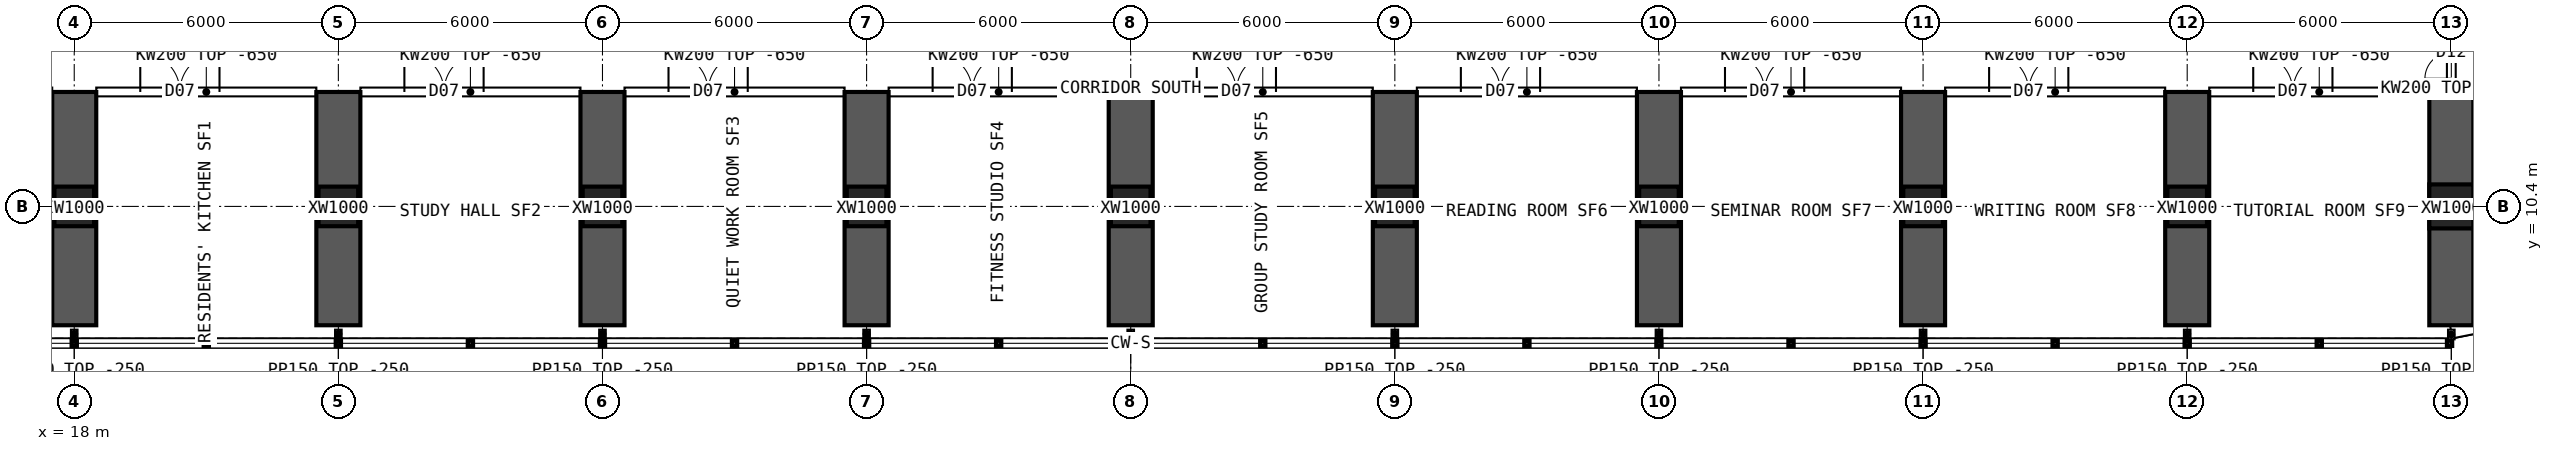
"""IFC4 building model, lengths in metres.
Left out: names, types, materials, properties, quantities, classifications, styles, units other than length and angle.
Written with IfcOpenShell. Run it as: python <this file> out.ifc"""

import sys

from ifc_helpers import new_model, si_unit, direction, frame, frame_2d, origin, origin_2d, place, context, subcontext, project, spatial, polyline, rectangle, hollow_rectangle, outline, extrude, element, fill, save


model = new_model("IFC4")
c1 = context("Model", 3, precision=1e-05, world=origin(), true_north=direction((0.0, 1.0)))
c2 = subcontext(c1, "Body", "Model", "MODEL_VIEW")
j1 = project(units=[si_unit("LENGTHUNIT", "METRE"), si_unit("PLANEANGLEUNIT", "RADIAN")], contexts=[c1])
p1 = place(None, origin())
s1 = spatial("IfcSite", under=j1, at=p1, CompositionType="ELEMENT")
p2 = place(p1, origin())
s2 = spatial("IfcBuilding", under=s1, at=p2, CompositionType="ELEMENT")
p3 = place(p2, frame((0.0, 0.0, 16.0)))
s3 = spatial("IfcBuildingStorey", under=s2, at=p3, CompositionType="ELEMENT", Elevation=16.0)
for number, where, z_axis, x_axis in (
    (1, (18.0, 10.4, 0.0), (0.0, 0.0, 1.0), (1.0, 0.0, 0.0)),
    (2, (24.0, 10.4, 0.0), (0.0, 0.0, 1.0), (1.0, 0.0, 0.0)),
    (3, (30.0, 10.4, 0.0), (0.0, 0.0, 1.0), (1.0, 0.0, 0.0)),
    (4, (36.0, 10.4, 0.0), (0.0, 0.0, 1.0), (1.0, 0.0, 0.0)),
    (5, (42.0, 10.4, 0.0), (0.0, 0.0, 1.0), (1.0, 0.0, 0.0)),
    (6, (48.0, 10.4, 0.0), (0.0, 0.0, 1.0), (1.0, 0.0, 0.0)),
    (7, (54.0, 10.4, 0.0), (0.0, 0.0, 1.0), (1.0, 0.0, 0.0)),
    (8, (60.0, 10.4, 0.0), (0.0, 0.0, 1.0), (1.0, 0.0, 0.0)),
    (9, (66.0, 10.4, 0.0), (0.0, 0.0, 1.0), (1.0, 0.0, 0.0)),
):
    element("IfcColumn", number, at=place(p3, frame(where, z_axis=z_axis, x_axis=x_axis)), inside=s3, PredefinedType="COLUMN", context=c2, shape_type="SweptSolid", body=[
        extrude(hollow_rectangle(XDim=0.9, YDim=0.9, WallThickness=0.09, at=origin_2d()), origin(), (0.0, 0.0, 1.0), 4.2),
    ])
p4 = place(p3, frame((72.0, 10.4, 0.0), z_axis=(0.0, 0.0, 1.0), x_axis=(1.0, 0.0, 0.0)))
e10 = element("IfcColumn", 10, at=p4, inside=s3, PredefinedType="COLUMN", context=c2, shape_type="SweptSolid", body=[
    extrude(hollow_rectangle(XDim=1.0, YDim=1.0, WallThickness=0.1, at=origin_2d()), origin(), (0.0, 0.0, 1.0), 4.2),
])
for number, where, z_axis, x_axis in (
    (11, (18.0, 7.7, 0.0), (0.0, 0.0, 1.0), (0.0, 1.0, 0.0)),
    (12, (24.0, 7.7, 0.0), (0.0, 0.0, 1.0), (0.0, 1.0, 0.0)),
    (13, (30.0, 7.7, 0.0), (0.0, 0.0, 1.0), (0.0, 1.0, 0.0)),
    (14, (36.0, 7.7, 0.0), (0.0, 0.0, 1.0), (0.0, 1.0, 0.0)),
    (15, (42.0, 7.7, 0.0), (0.0, 0.0, 1.0), (0.0, 1.0, 0.0)),
    (16, (48.0, 7.7, 0.0), (0.0, 0.0, 1.0), (0.0, 1.0, 0.0)),
    (17, (54.0, 7.7, 0.0), (0.0, 0.0, 1.0), (0.0, 1.0, 0.0)),
    (18, (60.0, 7.7, 0.0), (0.0, 0.0, 1.0), (0.0, 1.0, 0.0)),
    (19, (66.0, 7.7, 0.0), (0.0, 0.0, 1.0), (0.0, 1.0, 0.0)),
    (20, (72.0, 7.7, 0.0), (0.0, 0.0, 1.0), (0.0, 1.0, 0.0)),
):
    element("IfcWall", number, at=place(p3, frame(where, z_axis=z_axis, x_axis=x_axis)), inside=s3, PredefinedType="SHEAR", context=c2, shape_type="SweptSolid", body=[
        extrude(rectangle(XDim=5.3, YDim=1.0, at=frame_2d((2.65, 0.0))), origin(), (0.0, 0.0, 1.0), 4.2),
    ])
p5 = place(p3, frame((72.0, 7.55, 0.0), z_axis=(0.0, 0.0, 1.0), x_axis=(0.980787251524, 0.195080412259, 0.0)))
e21 = element("IfcWall", 21, at=p5, inside=s3, PredefinedType="SOLIDWALL", context=c2, shape_type="SweptSolid", body=[
    extrude(outline(polyline([(-0.03, -0.15), (3.249, -0.15), (3.189, 0.15), (0.03, 0.15), (-0.03, -0.15)])), origin(), (0.0, 0.0, 1.0), 3.95),
])
p6 = place(p5, frame((0.909, 0.0, 0.9)))
e22 = element("IfcOpeningElement", 22, at=p6, cuts=e21, PredefinedType="OPENING", context=c2, shape_type="SweptSolid", body=[
    extrude(rectangle(XDim=1.4, YDim=1.8, at=frame_2d((0.7, 0.9))), frame((0.0, 0.16, 0.0), z_axis=(0.0, -1.0, 0.0), x_axis=(1.0, 0.0, 0.0)), (0.0, 0.0, 1.0), 0.32),
])
p7 = place(p3, frame((18.5, 13.0, 0.0), z_axis=(0.0, 0.0, 1.0), x_axis=(1.0, 0.0, 0.0)))
e23 = element("IfcWall", 23, at=p7, inside=s3, PredefinedType="SOLIDWALL", context=c2, shape_type="SweptSolid", body=[
    extrude(outline(polyline([(0.0, 0.0), (5.0, 0.0), (5.0, 3.55), (0.0, 3.55), (0.0, 0.0)])), frame((0.0, 0.1, 0.0), z_axis=(0.0, -1.0, 0.0), x_axis=(1.0, 0.0, 0.0)), (0.0, 0.0, 1.0), 0.2),
])
p8 = place(p7, frame((1.0, 0.0, 0.0)))
e24 = element("IfcOpeningElement", 24, at=p8, cuts=e23, PredefinedType="OPENING", context=c2, shape_type="SweptSolid", body=[
    extrude(rectangle(XDim=1.8, YDim=2.1, at=frame_2d((0.9, 1.05))), frame((0.0, 0.11, 0.0), z_axis=(0.0, -1.0, 0.0), x_axis=(1.0, 0.0, 0.0)), (0.0, 0.0, 1.0), 0.22),
])
p9 = place(p3, frame((24.5, 13.0, 0.0), z_axis=(0.0, 0.0, 1.0), x_axis=(1.0, 0.0, 0.0)))
e25 = element("IfcWall", 25, at=p9, inside=s3, PredefinedType="SOLIDWALL", context=c2, shape_type="SweptSolid", body=[
    extrude(outline(polyline([(0.0, 0.0), (5.0, 0.0), (5.0, 3.55), (0.0, 3.55), (0.0, 0.0)])), frame((0.0, 0.1, 0.0), z_axis=(0.0, -1.0, 0.0), x_axis=(1.0, 0.0, 0.0)), (0.0, 0.0, 1.0), 0.2),
])
p10 = place(p9, frame((1.0, 0.0, 0.0)))
e26 = element("IfcOpeningElement", 26, at=p10, cuts=e25, PredefinedType="OPENING", context=c2, shape_type="SweptSolid", body=[
    extrude(rectangle(XDim=1.8, YDim=2.1, at=frame_2d((0.9, 1.05))), frame((0.0, 0.11, 0.0), z_axis=(0.0, -1.0, 0.0), x_axis=(1.0, 0.0, 0.0)), (0.0, 0.0, 1.0), 0.22),
])
p11 = place(p3, frame((30.5, 13.0, 0.0), z_axis=(0.0, 0.0, 1.0), x_axis=(1.0, 0.0, 0.0)))
e27 = element("IfcWall", 27, at=p11, inside=s3, PredefinedType="SOLIDWALL", context=c2, shape_type="SweptSolid", body=[
    extrude(outline(polyline([(0.0, 0.0), (5.0, 0.0), (5.0, 3.55), (0.0, 3.55), (0.0, 0.0)])), frame((0.0, 0.1, 0.0), z_axis=(0.0, -1.0, 0.0), x_axis=(1.0, 0.0, 0.0)), (0.0, 0.0, 1.0), 0.2),
])
p12 = place(p11, frame((1.0, 0.0, 0.0)))
e28 = element("IfcOpeningElement", 28, at=p12, cuts=e27, PredefinedType="OPENING", context=c2, shape_type="SweptSolid", body=[
    extrude(rectangle(XDim=1.8, YDim=2.1, at=frame_2d((0.9, 1.05))), frame((0.0, 0.11, 0.0), z_axis=(0.0, -1.0, 0.0), x_axis=(1.0, 0.0, 0.0)), (0.0, 0.0, 1.0), 0.22),
])
p13 = place(p3, frame((36.5, 13.0, 0.0), z_axis=(0.0, 0.0, 1.0), x_axis=(1.0, 0.0, 0.0)))
e29 = element("IfcWall", 29, at=p13, inside=s3, PredefinedType="SOLIDWALL", context=c2, shape_type="SweptSolid", body=[
    extrude(outline(polyline([(0.0, 0.0), (5.0, 0.0), (5.0, 3.55), (0.0, 3.55), (0.0, 0.0)])), frame((0.0, 0.1, 0.0), z_axis=(0.0, -1.0, 0.0), x_axis=(1.0, 0.0, 0.0)), (0.0, 0.0, 1.0), 0.2),
])
p14 = place(p13, frame((1.0, 0.0, 0.0)))
e30 = element("IfcOpeningElement", 30, at=p14, cuts=e29, PredefinedType="OPENING", context=c2, shape_type="SweptSolid", body=[
    extrude(rectangle(XDim=1.8, YDim=2.1, at=frame_2d((0.9, 1.05))), frame((0.0, 0.11, 0.0), z_axis=(0.0, -1.0, 0.0), x_axis=(1.0, 0.0, 0.0)), (0.0, 0.0, 1.0), 0.22),
])
p15 = place(p3, frame((42.5, 13.0, 0.0), z_axis=(0.0, 0.0, 1.0), x_axis=(1.0, 0.0, 0.0)))
e31 = element("IfcWall", 31, at=p15, inside=s3, PredefinedType="SOLIDWALL", context=c2, shape_type="SweptSolid", body=[
    extrude(outline(polyline([(0.0, 0.0), (5.0, 0.0), (5.0, 3.55), (0.0, 3.55), (0.0, 0.0)])), frame((0.0, 0.1, 0.0), z_axis=(0.0, -1.0, 0.0), x_axis=(1.0, 0.0, 0.0)), (0.0, 0.0, 1.0), 0.2),
])
p16 = place(p15, frame((1.0, 0.0, 0.0)))
e32 = element("IfcOpeningElement", 32, at=p16, cuts=e31, PredefinedType="OPENING", context=c2, shape_type="SweptSolid", body=[
    extrude(rectangle(XDim=1.8, YDim=2.1, at=frame_2d((0.9, 1.05))), frame((0.0, 0.11, 0.0), z_axis=(0.0, -1.0, 0.0), x_axis=(1.0, 0.0, 0.0)), (0.0, 0.0, 1.0), 0.22),
])
p17 = place(p3, frame((48.5, 13.0, 0.0), z_axis=(0.0, 0.0, 1.0), x_axis=(1.0, 0.0, 0.0)))
e33 = element("IfcWall", 33, at=p17, inside=s3, PredefinedType="SOLIDWALL", context=c2, shape_type="SweptSolid", body=[
    extrude(outline(polyline([(0.0, 0.0), (5.0, 0.0), (5.0, 3.55), (0.0, 3.55), (0.0, 0.0)])), frame((0.0, 0.1, 0.0), z_axis=(0.0, -1.0, 0.0), x_axis=(1.0, 0.0, 0.0)), (0.0, 0.0, 1.0), 0.2),
])
p18 = place(p17, frame((1.0, 0.0, 0.0)))
e34 = element("IfcOpeningElement", 34, at=p18, cuts=e33, PredefinedType="OPENING", context=c2, shape_type="SweptSolid", body=[
    extrude(rectangle(XDim=1.8, YDim=2.1, at=frame_2d((0.9, 1.05))), frame((0.0, 0.11, 0.0), z_axis=(0.0, -1.0, 0.0), x_axis=(1.0, 0.0, 0.0)), (0.0, 0.0, 1.0), 0.22),
])
p19 = place(p3, frame((54.5, 13.0, 0.0), z_axis=(0.0, 0.0, 1.0), x_axis=(1.0, 0.0, 0.0)))
e35 = element("IfcWall", 35, at=p19, inside=s3, PredefinedType="SOLIDWALL", context=c2, shape_type="SweptSolid", body=[
    extrude(outline(polyline([(0.0, 0.0), (5.0, 0.0), (5.0, 3.55), (0.0, 3.55), (0.0, 0.0)])), frame((0.0, 0.1, 0.0), z_axis=(0.0, -1.0, 0.0), x_axis=(1.0, 0.0, 0.0)), (0.0, 0.0, 1.0), 0.2),
])
p20 = place(p19, frame((1.0, 0.0, 0.0)))
e36 = element("IfcOpeningElement", 36, at=p20, cuts=e35, PredefinedType="OPENING", context=c2, shape_type="SweptSolid", body=[
    extrude(rectangle(XDim=1.8, YDim=2.1, at=frame_2d((0.9, 1.05))), frame((0.0, 0.11, 0.0), z_axis=(0.0, -1.0, 0.0), x_axis=(1.0, 0.0, 0.0)), (0.0, 0.0, 1.0), 0.22),
])
p21 = place(p3, frame((60.5, 13.0, 0.0), z_axis=(0.0, 0.0, 1.0), x_axis=(1.0, 0.0, 0.0)))
e37 = element("IfcWall", 37, at=p21, inside=s3, PredefinedType="SOLIDWALL", context=c2, shape_type="SweptSolid", body=[
    extrude(outline(polyline([(0.0, 0.0), (5.0, 0.0), (5.0, 3.55), (0.0, 3.55), (0.0, 0.0)])), frame((0.0, 0.1, 0.0), z_axis=(0.0, -1.0, 0.0), x_axis=(1.0, 0.0, 0.0)), (0.0, 0.0, 1.0), 0.2),
])
p22 = place(p21, frame((1.0, 0.0, 0.0)))
e38 = element("IfcOpeningElement", 38, at=p22, cuts=e37, PredefinedType="OPENING", context=c2, shape_type="SweptSolid", body=[
    extrude(rectangle(XDim=1.8, YDim=2.1, at=frame_2d((0.9, 1.05))), frame((0.0, 0.11, 0.0), z_axis=(0.0, -1.0, 0.0), x_axis=(1.0, 0.0, 0.0)), (0.0, 0.0, 1.0), 0.22),
])
p23 = place(p3, frame((66.5, 13.0, 0.0), z_axis=(0.0, 0.0, 1.0), x_axis=(1.0, 0.0, 0.0)))
e39 = element("IfcWall", 39, at=p23, inside=s3, PredefinedType="SOLIDWALL", context=c2, shape_type="SweptSolid", body=[
    extrude(outline(polyline([(0.0, 0.0), (5.0, 0.0), (5.0, 3.55), (0.0, 3.55), (0.0, 0.0)])), frame((0.0, 0.1, 0.0), z_axis=(0.0, -1.0, 0.0), x_axis=(1.0, 0.0, 0.0)), (0.0, 0.0, 1.0), 0.2),
])
p24 = place(p23, frame((1.0, 0.0, 0.0)))
e40 = element("IfcOpeningElement", 40, at=p24, cuts=e39, PredefinedType="OPENING", context=c2, shape_type="SweptSolid", body=[
    extrude(rectangle(XDim=1.8, YDim=2.1, at=frame_2d((0.9, 1.05))), frame((0.0, 0.11, 0.0), z_axis=(0.0, -1.0, 0.0), x_axis=(1.0, 0.0, 0.0)), (0.0, 0.0, 1.0), 0.22),
])
p25 = place(p3, frame((72.0, 13.1, 0.0), z_axis=(0.0, 0.0, 1.0), x_axis=(0.0, 1.0, 0.0)))
e41 = element("IfcWall", 41, at=p25, inside=s3, PredefinedType="SOLIDWALL", context=c2, shape_type="SweptSolid", body=[
    extrude(outline(polyline([(0.0, 0.0), (1.6, 0.0), (1.6, 3.5), (0.0, 3.5), (0.0, 0.0)])), frame((0.0, 0.1, 0.0), z_axis=(0.0, -1.0, 0.0), x_axis=(1.0, 0.0, 0.0)), (0.0, 0.0, 1.0), 0.2),
])
p26 = place(p25, frame((0.2, 0.0, 0.0)))
e42 = element("IfcOpeningElement", 42, at=p26, cuts=e41, PredefinedType="OPENING", context=c2, shape_type="SweptSolid", body=[
    extrude(rectangle(XDim=1.2, YDim=2.1, at=frame_2d((0.6, 1.05))), frame((0.0, 0.11, 0.0), z_axis=(0.0, -1.0, 0.0), x_axis=(1.0, 0.0, 0.0)), (0.0, 0.0, 1.0), 0.22),
])
for number, where, z_axis, x_axis in (
    (43, (18.0, 7.6, 0.0), (0.0, 0.0, 1.0), (0.0, -1.0, 0.0)),
    (44, (24.0, 7.6, 0.0), (0.0, 0.0, 1.0), (0.0, -1.0, 0.0)),
    (45, (30.0, 7.6, 0.0), (0.0, 0.0, 1.0), (0.0, -1.0, 0.0)),
    (46, (36.0, 7.6, 0.0), (0.0, 0.0, 1.0), (0.0, -1.0, 0.0)),
    (47, (42.0, 7.6, 0.0), (0.0, 0.0, 1.0), (0.0, -1.0, 0.0)),
    (48, (48.0, 7.6, 0.0), (0.0, 0.0, 1.0), (0.0, -1.0, 0.0)),
    (49, (54.0, 7.6, 0.0), (0.0, 0.0, 1.0), (0.0, -1.0, 0.0)),
    (50, (60.0, 7.6, 0.0), (0.0, 0.0, 1.0), (0.0, -1.0, 0.0)),
    (51, (66.0, 7.6, 0.0), (0.0, 0.0, 1.0), (0.0, -1.0, 0.0)),
):
    element("IfcWall", number, at=place(p3, frame(where, z_axis=z_axis, x_axis=x_axis)), inside=s3, PredefinedType="PARTITIONING", context=c2, shape_type="SweptSolid", body=[
        extrude(rectangle(XDim=0.19, YDim=0.15, at=frame_2d((0.095, 0.0))), origin(), (0.0, 0.0, 1.0), 3.95),
    ])
p27 = place(p3, frame((72.0, 7.6, 0.0), z_axis=(0.0, 0.0, 1.0), x_axis=(0.0, -1.0, 0.0)))
e52 = element("IfcWall", 52, at=p27, inside=s3, PredefinedType="PARTITIONING", context=c2, shape_type="SweptSolid", body=[
    extrude(rectangle(XDim=0.22, YDim=0.15, at=frame_2d((0.11, 0.0))), origin(), (0.0, 0.0, 1.0), 3.95),
])
p28 = place(p8, origin())
e53 = element("IfcDoor", 53, at=p28, inside=s3, OperationType="DOUBLE_DOOR_SINGLE_SWING", PredefinedType="DOOR", context=c2, shape_type="SweptSolid", body=[
    extrude(rectangle(XDim=1.8, YDim=2.1, at=frame_2d((0.9, 1.05))), frame((0.0, 0.025, 0.0), z_axis=(0.0, -1.0, 0.0), x_axis=(1.0, 0.0, 0.0)), (0.0, 0.0, 1.0), 0.05),
])
fill(e24, e53)
p29 = place(p10, origin())
e54 = element("IfcDoor", 54, at=p29, inside=s3, OperationType="DOUBLE_DOOR_SINGLE_SWING", PredefinedType="DOOR", context=c2, shape_type="SweptSolid", body=[
    extrude(rectangle(XDim=1.8, YDim=2.1, at=frame_2d((0.9, 1.05))), frame((0.0, 0.025, 0.0), z_axis=(0.0, -1.0, 0.0), x_axis=(1.0, 0.0, 0.0)), (0.0, 0.0, 1.0), 0.05),
])
fill(e26, e54)
p30 = place(p12, origin())
e55 = element("IfcDoor", 55, at=p30, inside=s3, OperationType="DOUBLE_DOOR_SINGLE_SWING", PredefinedType="DOOR", context=c2, shape_type="SweptSolid", body=[
    extrude(rectangle(XDim=1.8, YDim=2.1, at=frame_2d((0.9, 1.05))), frame((0.0, 0.025, 0.0), z_axis=(0.0, -1.0, 0.0), x_axis=(1.0, 0.0, 0.0)), (0.0, 0.0, 1.0), 0.05),
])
fill(e28, e55)
p31 = place(p14, origin())
e56 = element("IfcDoor", 56, at=p31, inside=s3, OperationType="DOUBLE_DOOR_SINGLE_SWING", PredefinedType="DOOR", context=c2, shape_type="SweptSolid", body=[
    extrude(rectangle(XDim=1.8, YDim=2.1, at=frame_2d((0.9, 1.05))), frame((0.0, 0.025, 0.0), z_axis=(0.0, -1.0, 0.0), x_axis=(1.0, 0.0, 0.0)), (0.0, 0.0, 1.0), 0.05),
])
fill(e30, e56)
p32 = place(p16, origin())
e57 = element("IfcDoor", 57, at=p32, inside=s3, OperationType="DOUBLE_DOOR_SINGLE_SWING", PredefinedType="DOOR", context=c2, shape_type="SweptSolid", body=[
    extrude(rectangle(XDim=1.8, YDim=2.1, at=frame_2d((0.9, 1.05))), frame((0.0, 0.025, 0.0), z_axis=(0.0, -1.0, 0.0), x_axis=(1.0, 0.0, 0.0)), (0.0, 0.0, 1.0), 0.05),
])
fill(e32, e57)
p33 = place(p18, origin())
e58 = element("IfcDoor", 58, at=p33, inside=s3, OperationType="DOUBLE_DOOR_SINGLE_SWING", PredefinedType="DOOR", context=c2, shape_type="SweptSolid", body=[
    extrude(rectangle(XDim=1.8, YDim=2.1, at=frame_2d((0.9, 1.05))), frame((0.0, 0.025, 0.0), z_axis=(0.0, -1.0, 0.0), x_axis=(1.0, 0.0, 0.0)), (0.0, 0.0, 1.0), 0.05),
])
fill(e34, e58)
p34 = place(p20, origin())
e59 = element("IfcDoor", 59, at=p34, inside=s3, OperationType="DOUBLE_DOOR_SINGLE_SWING", PredefinedType="DOOR", context=c2, shape_type="SweptSolid", body=[
    extrude(rectangle(XDim=1.8, YDim=2.1, at=frame_2d((0.9, 1.05))), frame((0.0, 0.025, 0.0), z_axis=(0.0, -1.0, 0.0), x_axis=(1.0, 0.0, 0.0)), (0.0, 0.0, 1.0), 0.05),
])
fill(e36, e59)
p35 = place(p22, origin())
e60 = element("IfcDoor", 60, at=p35, inside=s3, OperationType="DOUBLE_DOOR_SINGLE_SWING", PredefinedType="DOOR", context=c2, shape_type="SweptSolid", body=[
    extrude(rectangle(XDim=1.8, YDim=2.1, at=frame_2d((0.9, 1.05))), frame((0.0, 0.025, 0.0), z_axis=(0.0, -1.0, 0.0), x_axis=(1.0, 0.0, 0.0)), (0.0, 0.0, 1.0), 0.05),
])
fill(e38, e60)
p36 = place(p24, origin())
e61 = element("IfcDoor", 61, at=p36, inside=s3, OperationType="DOUBLE_DOOR_SINGLE_SWING", PredefinedType="DOOR", context=c2, shape_type="SweptSolid", body=[
    extrude(rectangle(XDim=1.8, YDim=2.1, at=frame_2d((0.9, 1.05))), frame((0.0, 0.025, 0.0), z_axis=(0.0, -1.0, 0.0), x_axis=(1.0, 0.0, 0.0)), (0.0, 0.0, 1.0), 0.05),
])
fill(e40, e61)
p37 = place(p26, origin())
e62 = element("IfcDoor", 62, at=p37, inside=s3, OperationType="DOUBLE_DOOR_SINGLE_SWING", PredefinedType="DOOR", context=c2, shape_type="SweptSolid", body=[
    extrude(rectangle(XDim=1.2, YDim=2.1, at=frame_2d((0.6, 1.05))), frame((0.0, 0.025, 0.0), z_axis=(0.0, -1.0, 0.0), x_axis=(1.0, 0.0, 0.0)), (0.0, 0.0, 1.0), 0.05),
])
fill(e42, e62)
save(model, sys.argv[1])
